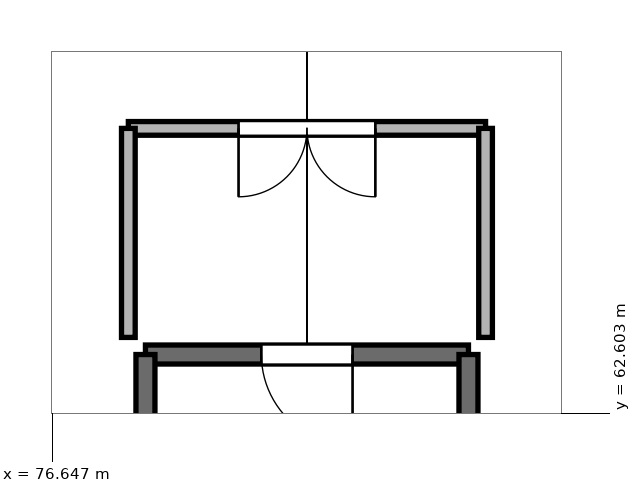
"""IFC4 building model, lengths in metres.
Left out: names, types, materials, properties, quantities, classifications, styles, units other than length and angle.
Written with IfcOpenShell. Run it as: python <this file> out.ifc"""

import sys

from ifc_helpers import new_model, si_unit, direction, frame, frame_2d, origin, place, context, subcontext, project, spatial, rectangle, extrude, element, fill, save


model = new_model("IFC4")
c1 = context("Model", 3, precision=1e-05, world=origin(), true_north=direction((0.0, 1.0)))
c2 = subcontext(c1, "Body", "Model", "MODEL_VIEW")
j1 = project(units=[si_unit("LENGTHUNIT", "METRE"), si_unit("PLANEANGLEUNIT", "RADIAN")], contexts=[c1])
p1 = place(None, origin())
s1 = spatial("IfcSite", under=j1, at=p1, CompositionType="ELEMENT")
p2 = place(p1, origin())
s2 = spatial("IfcBuilding", under=s1, at=p2, CompositionType="ELEMENT")
p3 = place(p2, frame((0.0, 0.0, 60.05)))
s3 = spatial("IfcBuildingStorey", under=s2, at=p3, CompositionType="ELEMENT", Elevation=60.05)
p4 = place(p3, frame((82.125, 63.375, 0.0), z_axis=(0.0, 0.0, 1.0), x_axis=(-1.0, 0.0, 0.0)))
e1 = element("IfcWall", 1, at=p4, inside=s3, PredefinedType="SHEAR", context=c2, shape_type="SweptSolid", body=[
    extrude(rectangle(XDim=4.25, YDim=0.25, at=frame_2d((2.125, 0.0))), origin(), (0.0, 0.0, 1.0), 3.04),
])
p5 = place(p4, frame((1.525, 0.0, 0.0)))
e2 = element("IfcOpeningElement", 2, at=p5, cuts=e1, PredefinedType="OPENING", context=c2, shape_type="SweptSolid", body=[
    extrude(rectangle(XDim=1.2, YDim=2.2, at=frame_2d((0.6, 1.1))), frame((0.0, 0.137, 0.0), z_axis=(0.0, -1.0, 0.0), x_axis=(1.0, 0.0, 0.0)), (0.0, 0.0, 1.0), 0.274),
])
for number, where, z_axis, x_axis in (
    (3, (77.875, 63.375, 0.0), (0.0, 0.0, 1.0), (0.0, -1.0, 0.0)),
    (4, (82.125, 56.175, 0.0), (0.0, 0.0, 1.0), (0.0, 1.0, 0.0)),
):
    element("IfcWall", number, at=place(p3, frame(where, z_axis=z_axis, x_axis=x_axis)), inside=s3, PredefinedType="SHEAR", context=c2, shape_type="SweptSolid", body=[
        extrude(rectangle(XDim=7.2, YDim=0.25, at=frame_2d((3.6, 0.0))), origin(), (0.0, 0.0, 1.0), 3.04),
    ])
p6 = place(p3, frame((77.65, 66.35, 0.0), z_axis=(0.0, 0.0, 1.0), x_axis=(1.0, 0.0, 0.0)))
e5 = element("IfcWall", 5, at=p6, inside=s3, PredefinedType="PARTITIONING", context=c2, shape_type="SweptSolid", body=[
    extrude(rectangle(XDim=4.7, YDim=0.18, at=frame_2d((2.35, 0.0))), origin(), (0.0, 0.0, 1.0), 2.53),
])
p7 = place(p6, frame((1.45, 0.0, 0.0)))
e6 = element("IfcOpeningElement", 6, at=p7, cuts=e5, PredefinedType="OPENING", context=c2, shape_type="SweptSolid", body=[
    extrude(rectangle(XDim=1.8, YDim=2.2, at=frame_2d((0.9, 1.1))), frame((0.0, 0.102, 0.0), z_axis=(0.0, -1.0, 0.0), x_axis=(1.0, 0.0, 0.0)), (0.0, 0.0, 1.0), 0.204),
])
for number, where, z_axis, x_axis in (
    (7, (77.65, 63.6, 0.0), (0.0, 0.0, 1.0), (0.0, 1.0, 0.0)),
    (8, (82.35, 63.6, 0.0), (0.0, 0.0, 1.0), (0.0, 1.0, 0.0)),
):
    element("IfcWall", number, at=place(p3, frame(where, z_axis=z_axis, x_axis=x_axis)), inside=s3, PredefinedType="PARTITIONING", context=c2, shape_type="SweptSolid", body=[
        extrude(rectangle(XDim=2.75, YDim=0.18, at=frame_2d((1.375, 0.0))), origin(), (0.0, 0.0, 1.0), 2.53),
    ])
p8 = place(p5, origin())
e9 = element("IfcDoor", 9, at=p8, inside=s3, OperationType="SINGLE_SWING_LEFT", PredefinedType="DOOR", context=c2, shape_type="SweptSolid", body=[
    extrude(rectangle(XDim=1.2, YDim=2.2, at=frame_2d((0.6, 1.1))), frame((0.0, 0.025, 0.0), z_axis=(0.0, -1.0, 0.0), x_axis=(1.0, 0.0, 0.0)), (0.0, 0.0, 1.0), 0.05),
])
fill(e2, e9)
p9 = place(p7, frame((1.8, 0.0, 0.0), z_axis=(0.0, 0.0, 1.0), x_axis=(-1.0, 0.0, 0.0)))
e10 = element("IfcDoor", 10, at=p9, inside=s3, OperationType="DOUBLE_DOOR_SINGLE_SWING", PredefinedType="DOOR", context=c2, shape_type="SweptSolid", body=[
    extrude(rectangle(XDim=1.8, YDim=2.2, at=frame_2d((0.9, 1.1))), frame((0.0, 0.025, 0.0), z_axis=(0.0, -1.0, 0.0), x_axis=(1.0, 0.0, 0.0)), (0.0, 0.0, 1.0), 0.05),
])
fill(e6, e10)
save(model, sys.argv[1])
